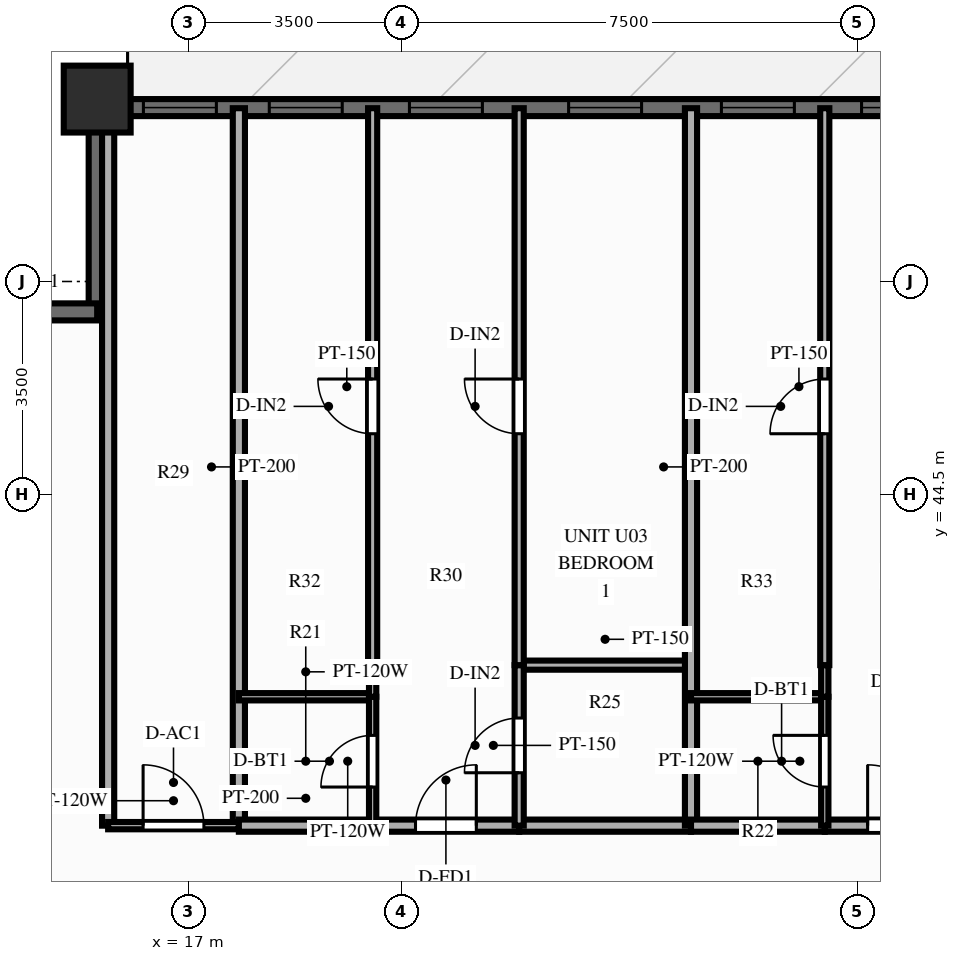
"""IFC4 building model, lengths in metres.
Left out: names, types, materials, properties, quantities, classifications, styles, units other than length and angle.
Written with IfcOpenShell. Run it as: python <this file> out.ifc"""

import sys

from ifc_helpers import new_model, si_unit, direction, frame, frame_2d, origin, origin_2d, place, context, subcontext, project, spatial, rectangle, extrude, source, transform, mapped, element, fill, save


model = new_model("IFC4")
c1 = context("Model", 3, precision=1e-05, world=origin(), true_north=direction((0.0, 1.0)))
c2 = subcontext(c1, "Body", "Model", "MODEL_VIEW")
j1 = project(units=[si_unit("LENGTHUNIT", "METRE"), si_unit("PLANEANGLEUNIT", "RADIAN")], contexts=[c1])
p1 = place(None, origin())
s1 = spatial("IfcSite", under=j1, at=p1, CompositionType="ELEMENT")
p2 = place(p1, origin())
s2 = spatial("IfcBuilding", under=s1, at=p2, CompositionType="ELEMENT")
p3 = place(p2, frame((0.0, 0.0, 49.4)))
s3 = spatial("IfcBuildingStorey", under=s2, at=p3, CompositionType="ELEMENT", Elevation=49.4)
m1 = source(origin(), c2, "Body", "SweptSolid", [
    extrude(rectangle(XDim=1.1, YDim=1.1, at=origin_2d()), origin(), (0.0, 0.0, 1.0), 3.0),
])
p4 = place(p3, frame((15.5, 51.0, 0.0), z_axis=(0.0, 0.0, 1.0), x_axis=(1.0, 0.0, 0.0)))
e1 = element("IfcColumn", 1, at=p4, inside=s3, PredefinedType="COLUMN", context=c2, shape_type="MappedRepresentation", body=[
    mapped(m1, transform((0.0, 0.0, 0.0), scale=1.0)),
])
p5 = place(p3, frame((15.5, 50.86, 0.0), z_axis=(0.0, 0.0, 1.0), x_axis=(1.0, 0.0, 0.0)))
e2 = element("IfcWall", 2, at=p5, inside=s3, PredefinedType="SOLIDWALL", context=c2, shape_type="SweptSolid", body=[
    extrude(rectangle(XDim=45.0, YDim=0.28, at=frame_2d((22.5, 0.0))), origin(), (0.0, 0.0, 1.0), 2.28),
])
p6 = place(p5, frame((0.76, 0.0, 0.25)))
e3 = element("IfcOpeningElement", 3, at=p6, cuts=e2, PredefinedType="OPENING", context=c2, shape_type="SweptSolid", body=[
    extrude(rectangle(XDim=1.2, YDim=1.5, at=frame_2d((0.6, 0.75))), frame((0.0, 0.152, 0.0), z_axis=(0.0, -1.0, 0.0), x_axis=(1.0, 0.0, 0.0)), (0.0, 0.0, 1.0), 0.304),
])
p7 = place(p5, frame((2.83, 0.0, 0.25)))
e4 = element("IfcOpeningElement", 4, at=p7, cuts=e2, PredefinedType="OPENING", context=c2, shape_type="SweptSolid", body=[
    extrude(rectangle(XDim=1.2, YDim=1.5, at=frame_2d((0.6, 0.75))), frame((0.0, 0.152, 0.0), z_axis=(0.0, -1.0, 0.0), x_axis=(1.0, 0.0, 0.0)), (0.0, 0.0, 1.0), 0.304),
])
p8 = place(p5, frame((5.135, 0.0, 0.25)))
e5 = element("IfcOpeningElement", 5, at=p8, cuts=e2, PredefinedType="OPENING", context=c2, shape_type="SweptSolid", body=[
    extrude(rectangle(XDim=1.2, YDim=1.5, at=frame_2d((0.6, 0.75))), frame((0.0, 0.152, 0.0), z_axis=(0.0, -1.0, 0.0), x_axis=(1.0, 0.0, 0.0)), (0.0, 0.0, 1.0), 0.304),
])
p9 = place(p5, frame((7.753, 0.0, 0.25)))
e6 = element("IfcOpeningElement", 6, at=p9, cuts=e2, PredefinedType="OPENING", context=c2, shape_type="SweptSolid", body=[
    extrude(rectangle(XDim=1.2, YDim=1.5, at=frame_2d((0.6, 0.75))), frame((0.0, 0.152, 0.0), z_axis=(0.0, -1.0, 0.0), x_axis=(1.0, 0.0, 0.0)), (0.0, 0.0, 1.0), 0.304),
])
p10 = place(p5, frame((10.266, 0.0, 0.25)))
e7 = element("IfcOpeningElement", 7, at=p10, cuts=e2, PredefinedType="OPENING", context=c2, shape_type="SweptSolid", body=[
    extrude(rectangle(XDim=1.2, YDim=1.5, at=frame_2d((0.6, 0.75))), frame((0.0, 0.152, 0.0), z_axis=(0.0, -1.0, 0.0), x_axis=(1.0, 0.0, 0.0)), (0.0, 0.0, 1.0), 0.304),
])
p11 = place(p5, frame((12.571, 0.0, 0.25)))
e8 = element("IfcOpeningElement", 8, at=p11, cuts=e2, PredefinedType="OPENING", context=c2, shape_type="SweptSolid", body=[
    extrude(rectangle(XDim=1.2, YDim=1.5, at=frame_2d((0.6, 0.75))), frame((0.0, 0.152, 0.0), z_axis=(0.0, -1.0, 0.0), x_axis=(1.0, 0.0, 0.0)), (0.0, 0.0, 1.0), 0.304),
])
p12 = place(p5, frame((14.643, 0.0, 0.25)))
e9 = element("IfcOpeningElement", 9, at=p12, cuts=e2, PredefinedType="OPENING", context=c2, shape_type="SweptSolid", body=[
    extrude(rectangle(XDim=0.7, YDim=1.5, at=frame_2d((0.35, 0.75))), frame((0.0, 0.152, 0.0), z_axis=(0.0, -1.0, 0.0), x_axis=(1.0, 0.0, 0.0)), (0.0, 0.0, 1.0), 0.304),
])
p13 = place(p5, frame((17.977, 0.0, 0.25)))
e10 = element("IfcOpeningElement", 10, at=p13, cuts=e2, PredefinedType="OPENING", context=c2, shape_type="SweptSolid", body=[
    extrude(rectangle(XDim=1.2, YDim=1.5, at=frame_2d((0.6, 0.75))), frame((0.0, 0.152, 0.0), z_axis=(0.0, -1.0, 0.0), x_axis=(1.0, 0.0, 0.0)), (0.0, 0.0, 1.0), 0.304),
])
p14 = place(p5, frame((23.263, 0.0, 0.0)))
e11 = element("IfcOpeningElement", 11, at=p14, cuts=e2, PredefinedType="OPENING", context=c2, shape_type="SweptSolid", body=[
    extrude(rectangle(XDim=1.1, YDim=2.15, at=frame_2d((0.55, 1.075))), frame((0.0, 0.152, 0.0), z_axis=(0.0, -1.0, 0.0), x_axis=(1.0, 0.0, 0.0)), (0.0, 0.0, 1.0), 0.304),
])
p15 = place(p5, frame((29.832, 0.0, 0.25)))
e12 = element("IfcOpeningElement", 12, at=p15, cuts=e2, PredefinedType="OPENING", context=c2, shape_type="SweptSolid", body=[
    extrude(rectangle(XDim=0.95, YDim=1.5, at=frame_2d((0.475, 0.75))), frame((0.0, 0.152, 0.0), z_axis=(0.0, -1.0, 0.0), x_axis=(1.0, 0.0, 0.0)), (0.0, 0.0, 1.0), 0.304),
])
p16 = place(p5, frame((31.998, 0.0, 0.25)))
e13 = element("IfcOpeningElement", 13, at=p16, cuts=e2, PredefinedType="OPENING", context=c2, shape_type="SweptSolid", body=[
    extrude(rectangle(XDim=1.2, YDim=1.5, at=frame_2d((0.6, 0.75))), frame((0.0, 0.152, 0.0), z_axis=(0.0, -1.0, 0.0), x_axis=(1.0, 0.0, 0.0)), (0.0, 0.0, 1.0), 0.304),
])
p17 = place(p5, frame((37.023, 0.0, 0.25)))
e14 = element("IfcOpeningElement", 14, at=p17, cuts=e2, PredefinedType="OPENING", context=c2, shape_type="SweptSolid", body=[
    extrude(rectangle(XDim=1.2, YDim=1.5, at=frame_2d((0.6, 0.75))), frame((0.0, 0.152, 0.0), z_axis=(0.0, -1.0, 0.0), x_axis=(1.0, 0.0, 0.0)), (0.0, 0.0, 1.0), 0.304),
])
p18 = place(p5, frame((42.341, 0.0, 0.25)))
e15 = element("IfcOpeningElement", 15, at=p18, cuts=e2, PredefinedType="OPENING", context=c2, shape_type="SweptSolid", body=[
    extrude(rectangle(XDim=1.2, YDim=1.5, at=frame_2d((0.6, 0.75))), frame((0.0, 0.152, 0.0), z_axis=(0.0, -1.0, 0.0), x_axis=(1.0, 0.0, 0.0)), (0.0, 0.0, 1.0), 0.304),
])
for number, where, z_axis, x_axis in (
    (16, (15.5, 47.5, 0.0), (0.0, 0.0, 1.0), (0.0, 1.0, 0.0)),
    (17, (12.08, 47.5, 0.0), (0.0, 0.0, 1.0), (1.0, 0.0, 0.0)),
):
    element("IfcWall", number, at=place(p3, frame(where, z_axis=z_axis, x_axis=x_axis)), inside=s3, PredefinedType="SOLIDWALL", context=c2, shape_type="SweptSolid", body=[
        extrude(rectangle(XDim=3.42, YDim=0.28, at=frame_2d((1.71, 0.0))), origin(), (0.0, 0.0, 1.0), 2.28),
    ])
for number, where, z_axis, x_axis in (
    (18, (15.68, 39.05, 0.0), (0.0, 0.0, 1.0), (0.0, 1.0, 0.0)),
    (19, (17.83, 39.05, 0.0), (0.0, 0.0, 1.0), (0.0, 1.0, 0.0)),
):
    element("IfcWall", number, at=place(p3, frame(where, z_axis=z_axis, x_axis=x_axis)), inside=s3, PredefinedType="PARTITIONING", context=c2, shape_type="SweptSolid", body=[
        extrude(rectangle(XDim=11.8, YDim=0.2, at=frame_2d((5.9, 0.0))), origin(), (0.0, 0.0, 1.0), 2.79),
    ])
p19 = place(p3, frame((15.68, 39.05, 0.0), z_axis=(0.0, 0.0, 1.0), x_axis=(1.0, 0.0, 0.0)))
e20 = element("IfcWall", 20, at=p19, inside=s3, PredefinedType="PARTITIONING", context=c2, shape_type="SweptSolid", body=[
    extrude(rectangle(XDim=2.15, YDim=0.12, at=frame_2d((1.075, 0.0))), origin(), (0.0, 0.0, 1.0), 2.79),
])
p20 = place(p19, frame((0.575, 0.0, 0.0)))
e21 = element("IfcOpeningElement", 21, at=p20, cuts=e20, PredefinedType="OPENING", context=c2, shape_type="SweptSolid", body=[
    extrude(rectangle(XDim=1.0, YDim=2.1, at=frame_2d((0.5, 1.05))), frame((0.0, 0.072, 0.0), z_axis=(0.0, -1.0, 0.0), x_axis=(1.0, 0.0, 0.0)), (0.0, 0.0, 1.0), 0.144),
])
p21 = place(p3, frame((17.83, 39.05, 0.0), z_axis=(0.0, 0.0, 1.0), x_axis=(1.0, 0.0, 0.0)))
e22 = element("IfcWall", 22, at=p21, inside=s3, PredefinedType="PARTITIONING", context=c2, shape_type="SweptSolid", body=[
    extrude(rectangle(XDim=2.2, YDim=0.2, at=frame_2d((1.1, 0.0))), origin(), (0.0, 0.0, 1.0), 2.79),
])
p22 = place(p3, frame((20.03, 39.05, 0.0), z_axis=(0.0, 0.0, 1.0), x_axis=(1.0, 0.0, 0.0)))
e23 = element("IfcWall", 23, at=p22, inside=s3, PredefinedType="PARTITIONING", context=c2, shape_type="SweptSolid", body=[
    extrude(rectangle(XDim=2.41, YDim=0.2, at=frame_2d((1.205, 0.0))), origin(), (0.0, 0.0, 1.0), 2.79),
])
p23 = place(p22, frame((0.705, 0.0, 0.0)))
e24 = element("IfcOpeningElement", 24, at=p23, cuts=e23, PredefinedType="OPENING", context=c2, shape_type="SweptSolid", body=[
    extrude(rectangle(XDim=1.0, YDim=2.15, at=frame_2d((0.5, 1.075))), frame((0.0, 0.112, 0.0), z_axis=(0.0, -1.0, 0.0), x_axis=(1.0, 0.0, 0.0)), (0.0, 0.0, 1.0), 0.224),
])
p24 = place(p3, frame((22.44, 39.05, 0.0), z_axis=(0.0, 0.0, 1.0), x_axis=(1.0, 0.0, 0.0)))
e25 = element("IfcWall", 25, at=p24, inside=s3, PredefinedType="PARTITIONING", context=c2, shape_type="SweptSolid", body=[
    extrude(rectangle(XDim=2.826, YDim=0.2, at=frame_2d((1.413, 0.0))), origin(), (0.0, 0.0, 1.0), 2.79),
])
p25 = place(p3, frame((17.83, 41.17, 0.0), z_axis=(0.0, 0.0, 1.0), x_axis=(1.0, 0.0, 0.0)))
e26 = element("IfcWall", 26, at=p25, inside=s3, PredefinedType="PARTITIONING", context=c2, shape_type="SweptSolid", body=[
    extrude(rectangle(XDim=2.2, YDim=0.12, at=frame_2d((1.1, 0.0))), origin(), (0.0, 0.0, 1.0), 2.79),
])
p26 = place(p3, frame((22.44, 41.69, 0.0), z_axis=(0.0, 0.0, 1.0), x_axis=(1.0, 0.0, 0.0)))
e27 = element("IfcWall", 27, at=p26, inside=s3, PredefinedType="PARTITIONING", context=c2, shape_type="SweptSolid", body=[
    extrude(rectangle(XDim=2.826, YDim=0.15, at=frame_2d((1.413, 0.0))), origin(), (0.0, 0.0, 1.0), 2.79),
])
p27 = place(p3, frame((20.03, 39.05, 0.0), z_axis=(0.0, 0.0, 1.0), x_axis=(0.0, 1.0, 0.0)))
e28 = element("IfcWall", 28, at=p27, inside=s3, PredefinedType="PARTITIONING", context=c2, shape_type="SweptSolid", body=[
    extrude(rectangle(XDim=2.12, YDim=0.12, at=frame_2d((1.06, 0.0))), origin(), (0.0, 0.0, 1.0), 2.79),
])
p28 = place(p27, frame((0.635, 0.0, 0.0)))
e29 = element("IfcOpeningElement", 29, at=p28, cuts=e28, PredefinedType="OPENING", context=c2, shape_type="SweptSolid", body=[
    extrude(rectangle(XDim=0.85, YDim=2.05, at=frame_2d((0.425, 1.025))), frame((0.0, 0.072, 0.0), z_axis=(0.0, -1.0, 0.0), x_axis=(1.0, 0.0, 0.0)), (0.0, 0.0, 1.0), 0.144),
])
p29 = place(p3, frame((20.03, 41.17, 0.0), z_axis=(0.0, 0.0, 1.0), x_axis=(0.0, 1.0, 0.0)))
e30 = element("IfcWall", 30, at=p29, inside=s3, PredefinedType="PARTITIONING", context=c2, shape_type="SweptSolid", body=[
    extrude(rectangle(XDim=0.52, YDim=0.12, at=frame_2d((0.26, 0.0))), origin(), (0.0, 0.0, 1.0), 2.79),
])
p30 = place(p3, frame((20.03, 41.69, 0.0), z_axis=(0.0, 0.0, 1.0), x_axis=(0.0, 1.0, 0.0)))
e31 = element("IfcWall", 31, at=p30, inside=s3, PredefinedType="PARTITIONING", context=c2, shape_type="SweptSolid", body=[
    extrude(rectangle(XDim=9.16, YDim=0.15, at=frame_2d((4.58, 0.0))), origin(), (0.0, 0.0, 1.0), 2.79),
])
p31 = place(p30, frame((3.806, 0.0, 0.0)))
e32 = element("IfcOpeningElement", 32, at=p31, cuts=e31, PredefinedType="OPENING", context=c2, shape_type="SweptSolid", body=[
    extrude(rectangle(XDim=0.9, YDim=2.1, at=frame_2d((0.45, 1.05))), frame((0.0, 0.087, 0.0), z_axis=(0.0, -1.0, 0.0), x_axis=(1.0, 0.0, 0.0)), (0.0, 0.0, 1.0), 0.174),
])
p32 = place(p3, frame((22.44, 39.05, 0.0), z_axis=(0.0, 0.0, 1.0), x_axis=(0.0, 1.0, 0.0)))
e33 = element("IfcWall", 33, at=p32, inside=s3, PredefinedType="PARTITIONING", context=c2, shape_type="SweptSolid", body=[
    extrude(rectangle(XDim=2.64, YDim=0.15, at=frame_2d((1.32, 0.0))), origin(), (0.0, 0.0, 1.0), 2.79),
])
p33 = place(p32, frame((0.87, 0.0, 0.0)))
e34 = element("IfcOpeningElement", 34, at=p33, cuts=e33, PredefinedType="OPENING", context=c2, shape_type="SweptSolid", body=[
    extrude(rectangle(XDim=0.9, YDim=2.1, at=frame_2d((0.45, 1.05))), frame((0.0, 0.087, 0.0), z_axis=(0.0, -1.0, 0.0), x_axis=(1.0, 0.0, 0.0)), (0.0, 0.0, 1.0), 0.174),
])
p34 = place(p3, frame((22.44, 41.69, 0.0), z_axis=(0.0, 0.0, 1.0), x_axis=(0.0, 1.0, 0.0)))
e35 = element("IfcWall", 35, at=p34, inside=s3, PredefinedType="PARTITIONING", context=c2, shape_type="SweptSolid", body=[
    extrude(rectangle(XDim=9.16, YDim=0.15, at=frame_2d((4.58, 0.0))), origin(), (0.0, 0.0, 1.0), 2.79),
])
p35 = place(p34, frame((3.806, 0.0, 0.0)))
e36 = element("IfcOpeningElement", 36, at=p35, cuts=e35, PredefinedType="OPENING", context=c2, shape_type="SweptSolid", body=[
    extrude(rectangle(XDim=0.9, YDim=2.1, at=frame_2d((0.45, 1.05))), frame((0.0, 0.087, 0.0), z_axis=(0.0, -1.0, 0.0), x_axis=(1.0, 0.0, 0.0)), (0.0, 0.0, 1.0), 0.174),
])
p36 = place(p3, frame((25.266, 39.05, 0.0), z_axis=(0.0, 0.0, 1.0), x_axis=(0.0, 1.0, 0.0)))
e37 = element("IfcWall", 37, at=p36, inside=s3, PredefinedType="PARTITIONING", context=c2, shape_type="SweptSolid", body=[
    extrude(rectangle(XDim=11.8, YDim=0.2, at=frame_2d((5.9, 0.0))), origin(), (0.0, 0.0, 1.0), 2.79),
])
p37 = place(p3, frame((25.266, 39.05, 0.0), z_axis=(0.0, 0.0, 1.0), x_axis=(1.0, 0.0, 0.0)))
e38 = element("IfcWall", 38, at=p37, inside=s3, PredefinedType="PARTITIONING", context=c2, shape_type="SweptSolid", body=[
    extrude(rectangle(XDim=2.2, YDim=0.2, at=frame_2d((1.1, 0.0))), origin(), (0.0, 0.0, 1.0), 2.79),
])
p38 = place(p3, frame((27.466, 39.05, 0.0), z_axis=(0.0, 0.0, 1.0), x_axis=(1.0, 0.0, 0.0)))
e39 = element("IfcWall", 39, at=p38, inside=s3, PredefinedType="PARTITIONING", context=c2, shape_type="SweptSolid", body=[
    extrude(rectangle(XDim=2.41, YDim=0.2, at=frame_2d((1.205, 0.0))), origin(), (0.0, 0.0, 1.0), 2.79),
])
p39 = place(p38, frame((0.705, 0.0, 0.0)))
e40 = element("IfcOpeningElement", 40, at=p39, cuts=e39, PredefinedType="OPENING", context=c2, shape_type="SweptSolid", body=[
    extrude(rectangle(XDim=1.0, YDim=2.15, at=frame_2d((0.5, 1.075))), frame((0.0, 0.112, 0.0), z_axis=(0.0, -1.0, 0.0), x_axis=(1.0, 0.0, 0.0)), (0.0, 0.0, 1.0), 0.224),
])
p40 = place(p3, frame((25.266, 41.17, 0.0), z_axis=(0.0, 0.0, 1.0), x_axis=(1.0, 0.0, 0.0)))
e41 = element("IfcWall", 41, at=p40, inside=s3, PredefinedType="PARTITIONING", context=c2, shape_type="SweptSolid", body=[
    extrude(rectangle(XDim=2.2, YDim=0.12, at=frame_2d((1.1, 0.0))), origin(), (0.0, 0.0, 1.0), 2.79),
])
p41 = place(p3, frame((27.466, 39.05, 0.0), z_axis=(0.0, 0.0, 1.0), x_axis=(0.0, 1.0, 0.0)))
e42 = element("IfcWall", 42, at=p41, inside=s3, PredefinedType="PARTITIONING", context=c2, shape_type="SweptSolid", body=[
    extrude(rectangle(XDim=2.12, YDim=0.12, at=frame_2d((1.06, 0.0))), origin(), (0.0, 0.0, 1.0), 2.79),
])
p42 = place(p41, frame((0.635, 0.0, 0.0)))
e43 = element("IfcOpeningElement", 43, at=p42, cuts=e42, PredefinedType="OPENING", context=c2, shape_type="SweptSolid", body=[
    extrude(rectangle(XDim=0.85, YDim=2.05, at=frame_2d((0.425, 1.025))), frame((0.0, 0.072, 0.0), z_axis=(0.0, -1.0, 0.0), x_axis=(1.0, 0.0, 0.0)), (0.0, 0.0, 1.0), 0.144),
])
p43 = place(p3, frame((27.466, 41.17, 0.0), z_axis=(0.0, 0.0, 1.0), x_axis=(0.0, 1.0, 0.0)))
e44 = element("IfcWall", 44, at=p43, inside=s3, PredefinedType="PARTITIONING", context=c2, shape_type="SweptSolid", body=[
    extrude(rectangle(XDim=0.52, YDim=0.12, at=frame_2d((0.26, 0.0))), origin(), (0.0, 0.0, 1.0), 2.79),
])
p44 = place(p3, frame((27.466, 41.69, 0.0), z_axis=(0.0, 0.0, 1.0), x_axis=(0.0, 1.0, 0.0)))
e45 = element("IfcWall", 45, at=p44, inside=s3, PredefinedType="PARTITIONING", context=c2, shape_type="SweptSolid", body=[
    extrude(rectangle(XDim=9.16, YDim=0.15, at=frame_2d((4.58, 0.0))), origin(), (0.0, 0.0, 1.0), 2.79),
])
p45 = place(p44, frame((3.806, 0.0, 0.0)))
e46 = element("IfcOpeningElement", 46, at=p45, cuts=e45, PredefinedType="OPENING", context=c2, shape_type="SweptSolid", body=[
    extrude(rectangle(XDim=0.9, YDim=2.1, at=frame_2d((0.45, 1.05))), frame((0.0, 0.087, 0.0), z_axis=(0.0, -1.0, 0.0), x_axis=(1.0, 0.0, 0.0)), (0.0, 0.0, 1.0), 0.174),
])
m2 = source(origin(), c2, "Body", "SweptSolid", [
    extrude(rectangle(XDim=1.2, YDim=1.5, at=frame_2d((0.6, 0.75))), frame((0.0, 0.03, 0.0), z_axis=(0.0, -1.0, 0.0), x_axis=(1.0, 0.0, 0.0)), (0.0, 0.0, 1.0), 0.06),
])
p46 = place(p6, origin())
e47 = element("IfcWindow", 47, at=p46, inside=s3, PartitioningType="SINGLE_PANEL", PredefinedType="WINDOW", context=c2, shape_type="MappedRepresentation", body=[
    mapped(m2, transform((0.0, 0.0, 0.0), scale=1.0)),
])
fill(e3, e47)
p47 = place(p7, origin())
e48 = element("IfcWindow", 48, at=p47, inside=s3, PartitioningType="SINGLE_PANEL", PredefinedType="WINDOW", context=c2, shape_type="MappedRepresentation", body=[
    mapped(m2, transform((0.0, 0.0, 0.0), scale=1.0)),
])
fill(e4, e48)
p48 = place(p8, origin())
e49 = element("IfcWindow", 49, at=p48, inside=s3, PartitioningType="SINGLE_PANEL", PredefinedType="WINDOW", context=c2, shape_type="MappedRepresentation", body=[
    mapped(m2, transform((0.0, 0.0, 0.0), scale=1.0)),
])
fill(e5, e49)
p49 = place(p9, origin())
e50 = element("IfcWindow", 50, at=p49, inside=s3, PartitioningType="SINGLE_PANEL", PredefinedType="WINDOW", context=c2, shape_type="MappedRepresentation", body=[
    mapped(m2, transform((0.0, 0.0, 0.0), scale=1.0)),
])
fill(e6, e50)
p50 = place(p10, origin())
e51 = element("IfcWindow", 51, at=p50, inside=s3, PartitioningType="SINGLE_PANEL", PredefinedType="WINDOW", context=c2, shape_type="MappedRepresentation", body=[
    mapped(m2, transform((0.0, 0.0, 0.0), scale=1.0)),
])
fill(e7, e51)
p51 = place(p11, origin())
e52 = element("IfcWindow", 52, at=p51, inside=s3, PartitioningType="SINGLE_PANEL", PredefinedType="WINDOW", context=c2, shape_type="MappedRepresentation", body=[
    mapped(m2, transform((0.0, 0.0, 0.0), scale=1.0)),
])
fill(e8, e52)
m3 = source(origin(), c2, "Body", "SweptSolid", [
    extrude(rectangle(XDim=1.0, YDim=2.1, at=frame_2d((0.5, 1.05))), frame((0.0, 0.025, 0.0), z_axis=(0.0, -1.0, 0.0), x_axis=(1.0, 0.0, 0.0)), (0.0, 0.0, 1.0), 0.05),
])
p52 = place(p20, origin())
e53 = element("IfcDoor", 53, at=p52, inside=s3, OperationType="SINGLE_SWING_LEFT", PredefinedType="DOOR", context=c2, shape_type="MappedRepresentation", body=[
    mapped(m3, transform((0.0, 0.0, 0.0), scale=1.0)),
])
fill(e21, e53)
m4 = source(origin(), c2, "Body", "SweptSolid", [
    extrude(rectangle(XDim=1.0, YDim=2.15, at=frame_2d((0.5, 1.075))), frame((0.0, 0.025, 0.0), z_axis=(0.0, -1.0, 0.0), x_axis=(1.0, 0.0, 0.0)), (0.0, 0.0, 1.0), 0.05),
])
p53 = place(p23, origin())
e54 = element("IfcDoor", 54, at=p53, inside=s3, OperationType="SINGLE_SWING_RIGHT", PredefinedType="DOOR", context=c2, shape_type="MappedRepresentation", body=[
    mapped(m4, transform((0.0, 0.0, 0.0), scale=1.0)),
])
fill(e24, e54)
m5 = source(origin(), c2, "Body", "SweptSolid", [
    extrude(rectangle(XDim=0.85, YDim=2.05, at=frame_2d((0.425, 1.025))), frame((0.0, 0.025, 0.0), z_axis=(0.0, -1.0, 0.0), x_axis=(1.0, 0.0, 0.0)), (0.0, 0.0, 1.0), 0.05),
])
p54 = place(p28, origin())
e55 = element("IfcDoor", 55, at=p54, inside=s3, OperationType="SINGLE_SWING_LEFT", PredefinedType="DOOR", context=c2, shape_type="MappedRepresentation", body=[
    mapped(m5, transform((0.0, 0.0, 0.0), scale=1.0)),
])
fill(e29, e55)
m6 = source(origin(), c2, "Body", "SweptSolid", [
    extrude(rectangle(XDim=0.9, YDim=2.1, at=frame_2d((0.45, 1.05))), frame((0.0, 0.025, 0.0), z_axis=(0.0, -1.0, 0.0), x_axis=(1.0, 0.0, 0.0)), (0.0, 0.0, 1.0), 0.05),
])
p55 = place(p31, origin())
e56 = element("IfcDoor", 56, at=p55, inside=s3, OperationType="SINGLE_SWING_RIGHT", PredefinedType="DOOR", context=c2, shape_type="MappedRepresentation", body=[
    mapped(m6, transform((0.0, 0.0, 0.0), scale=1.0)),
])
fill(e32, e56)
p56 = place(p33, origin())
e57 = element("IfcDoor", 57, at=p56, inside=s3, OperationType="SINGLE_SWING_LEFT", PredefinedType="DOOR", context=c2, shape_type="MappedRepresentation", body=[
    mapped(m6, transform((0.0, 0.0, 0.0), scale=1.0)),
])
fill(e34, e57)
p57 = place(p35, origin())
e58 = element("IfcDoor", 58, at=p57, inside=s3, OperationType="SINGLE_SWING_RIGHT", PredefinedType="DOOR", context=c2, shape_type="MappedRepresentation", body=[
    mapped(m6, transform((0.0, 0.0, 0.0), scale=1.0)),
])
fill(e36, e58)
p58 = place(p39, origin())
e59 = element("IfcDoor", 59, at=p58, inside=s3, OperationType="SINGLE_SWING_LEFT", PredefinedType="DOOR", context=c2, shape_type="MappedRepresentation", body=[
    mapped(m4, transform((0.0, 0.0, 0.0), scale=1.0)),
])
fill(e40, e59)
p59 = place(p42, origin())
e60 = element("IfcDoor", 60, at=p59, inside=s3, OperationType="SINGLE_SWING_RIGHT", PredefinedType="DOOR", context=c2, shape_type="MappedRepresentation", body=[
    mapped(m5, transform((0.0, 0.0, 0.0), scale=1.0)),
])
fill(e43, e60)
p60 = place(p45, origin())
e61 = element("IfcDoor", 61, at=p60, inside=s3, OperationType="SINGLE_SWING_LEFT", PredefinedType="DOOR", context=c2, shape_type="MappedRepresentation", body=[
    mapped(m6, transform((0.0, 0.0, 0.0), scale=1.0)),
])
fill(e46, e61)
save(model, sys.argv[1])
